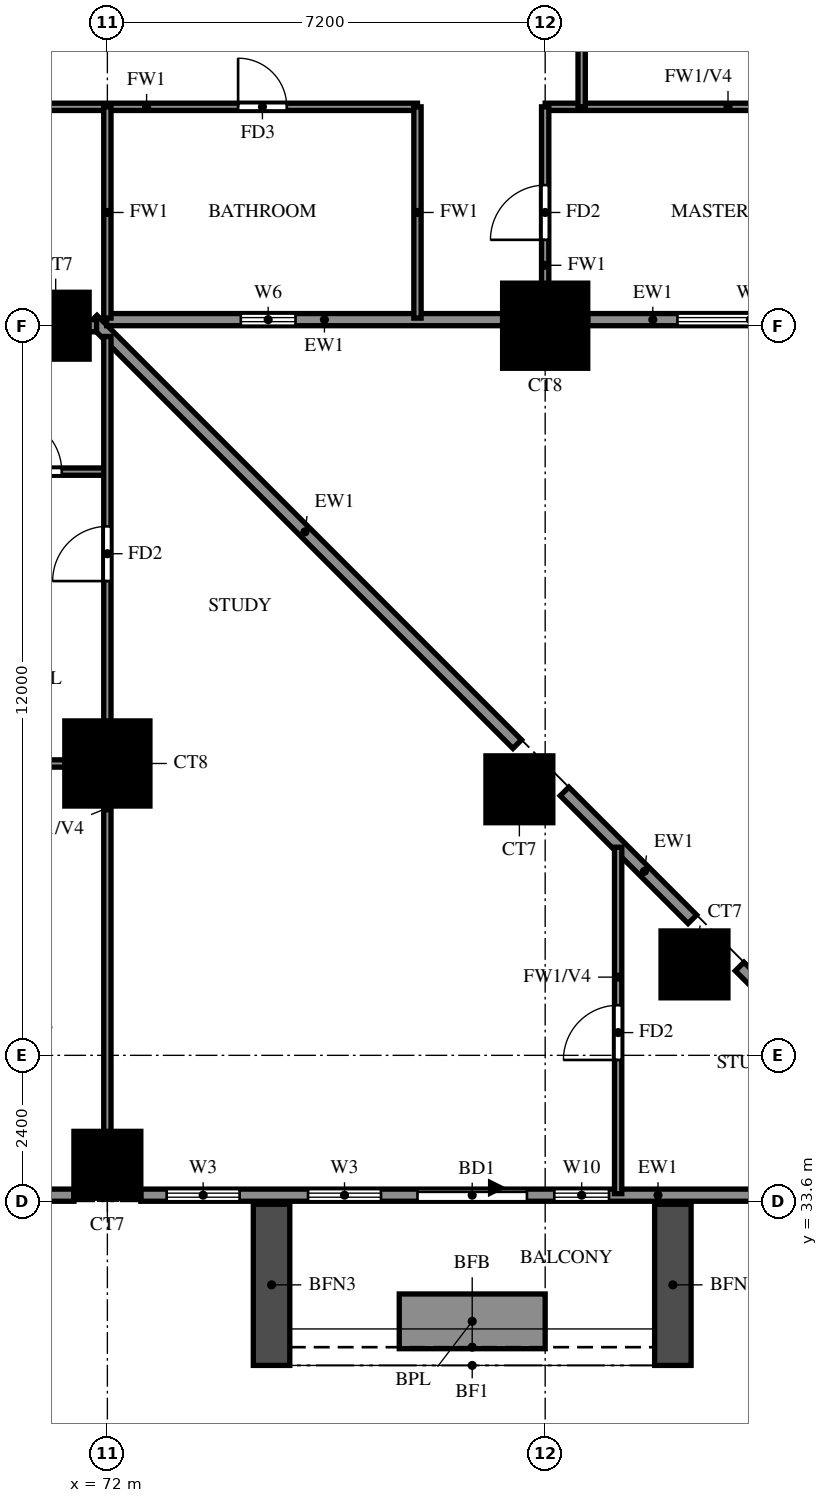
"""IFC4 building model, lengths in metres.
Left out: names, types, materials, properties, quantities, classifications, styles, units other than length and angle.
Written with IfcOpenShell. Run it as: python <this file> out.ifc"""

import sys

from ifc_helpers import new_model, si_unit, direction, frame, frame_2d, origin, origin_2d, place, context, subcontext, project, spatial, rectangle, extrude, source, transform, mapped, element, fill, save


model = new_model("IFC4")
c1 = context("Model", 3, precision=1e-05, world=origin(), true_north=direction((0.0, 1.0)))
c2 = subcontext(c1, "Body", "Model", "MODEL_VIEW")
j1 = project(units=[si_unit("LENGTHUNIT", "METRE"), si_unit("PLANEANGLEUNIT", "RADIAN")], contexts=[c1])
p1 = place(None, origin())
s1 = spatial("IfcSite", under=j1, at=p1, CompositionType="ELEMENT")
p2 = place(p1, origin())
s2 = spatial("IfcBuilding", under=s1, at=p2, CompositionType="ELEMENT")
p3 = place(p2, frame((0.0, 0.0, 37.5)))
s3 = spatial("IfcBuildingStorey", under=s2, at=p3, CompositionType="ELEMENT", Elevation=37.5)
m1 = source(origin(), c2, "Body", "SweptSolid", [
    extrude(rectangle(XDim=1.1, YDim=1.1, at=origin_2d()), origin(), (0.0, 0.0, 1.0), 3.18),
])
for number, where, z_axis, x_axis in (
    (1, (72.0, 34.2, 0.0), (0.0, 0.0, 1.0), (1.0, 0.0, 0.0)),
    (2, (81.656, 37.496, 0.0), (0.0, 0.0, 1.0), (1.0, 0.0, 0.0)),
    (3, (78.776, 40.376, 0.0), (0.0, 0.0, 1.0), (1.0, 0.0, 0.0)),
):
    element("IfcColumn", number, at=place(p3, frame(where, z_axis=z_axis, x_axis=x_axis)), inside=s3, PredefinedType="COLUMN", context=c2, shape_type="MappedRepresentation", body=[
        mapped(m1, transform((0.0, 0.0, 0.0))),
    ])
m2 = source(origin(), c2, "Body", "SweptSolid", [
    extrude(rectangle(XDim=1.4, YDim=1.4, at=origin_2d()), origin(), (0.0, 0.0, 1.0), 3.18),
])
p4 = place(p3, frame((72.0, 40.8, 0.0), z_axis=(0.0, 0.0, 1.0), x_axis=(1.0, 0.0, 0.0)))
e4 = element("IfcColumn", 4, at=p4, inside=s3, PredefinedType="COLUMN", context=c2, shape_type="MappedRepresentation", body=[
    mapped(m2, transform((0.0, 0.0, 0.0))),
])
p5 = place(p3, frame((71.15, 48.0, 0.0), z_axis=(0.0, 0.0, 1.0), x_axis=(1.0, 0.0, 0.0)))
e5 = element("IfcColumn", 5, at=p5, inside=s3, PredefinedType="COLUMN", context=c2, shape_type="MappedRepresentation", body=[
    mapped(m1, transform((0.0, 0.0, 0.0))),
])
p6 = place(p3, frame((79.2, 48.0, 0.0), z_axis=(0.0, 0.0, 1.0), x_axis=(1.0, 0.0, 0.0)))
e6 = element("IfcColumn", 6, at=p6, inside=s3, PredefinedType="COLUMN", context=c2, shape_type="MappedRepresentation", body=[
    mapped(m2, transform((0.0, 0.0, 0.0))),
])
p7 = place(p3, frame((85.996, 33.863, 0.0), z_axis=(0.0, 0.0, 1.0), x_axis=(-0.7070827891, 0.707130772459, 0.0)))
e7 = element("IfcWall", 7, at=p7, inside=s3, PredefinedType="SOLIDWALL", context=c2, shape_type="SweptSolid", body=[
    extrude(rectangle(XDim=5.088, YDim=0.2, at=frame_2d((2.544, 0.0))), origin(), (0.0, 0.0, 1.0), 3.18),
])
p8 = place(p3, frame((81.62, 38.238, 0.0), z_axis=(0.0, 0.0, 1.0), x_axis=(-0.707106781187, 0.707106781187, 0.0)))
e8 = element("IfcWall", 8, at=p8, inside=s3, PredefinedType="SOLIDWALL", context=c2, shape_type="SweptSolid", body=[
    extrude(rectangle(XDim=2.973, YDim=0.2, at=frame_2d((1.486, 0.0))), origin(), (0.0, 0.0, 1.0), 3.18),
])
p9 = place(p3, frame((78.74, 41.118, 0.0), z_axis=(0.0, 0.0, 1.0), x_axis=(-0.707106781187, 0.707106781187, 0.0)))
e9 = element("IfcWall", 9, at=p9, inside=s3, PredefinedType="SOLIDWALL", context=c2, shape_type="SweptSolid", body=[
    extrude(rectangle(XDim=9.874, YDim=0.2, at=frame_2d((4.937, 0.0))), origin(), (0.0, 0.0, 1.0), 3.18),
])
p10 = place(p3, frame((71.989, 48.1, 0.0), z_axis=(0.0, 0.0, 1.0), x_axis=(1.0, 0.0, 0.0)))
e10 = element("IfcWall", 10, at=p10, inside=s3, PredefinedType="SOLIDWALL", context=c2, shape_type="SweptSolid", body=[
    extrude(rectangle(XDim=6.511, YDim=0.2, at=frame_2d((3.256, 0.0))), origin(), (0.0, 0.0, 1.0), 3.18),
])
p11 = place(p10, frame((2.206, 0.0, 1.5)))
e11 = element("IfcOpeningElement", 11, at=p11, cuts=e10, PredefinedType="OPENING", context=c2, shape_type="SweptSolid", body=[
    extrude(rectangle(XDim=0.9, YDim=0.9, at=frame_2d((0.45, 0.45))), frame((0.0, 0.11, 0.0), z_axis=(0.0, -1.0, 0.0), x_axis=(1.0, 0.0, 0.0)), (0.0, 0.0, 1.0), 0.22),
])
p12 = place(p3, frame((79.9, 48.1, 0.0), z_axis=(0.0, 0.0, 1.0), x_axis=(1.0, 0.0, 0.0)))
e12 = element("IfcWall", 12, at=p12, inside=s3, PredefinedType="SOLIDWALL", context=c2, shape_type="SweptSolid", body=[
    extrude(rectangle(XDim=5.35, YDim=0.2, at=frame_2d((2.675, 0.0))), origin(), (0.0, 0.0, 1.0), 3.18),
])
p13 = place(p12, frame((1.475, 0.0, 0.6)))
e13 = element("IfcOpeningElement", 13, at=p13, cuts=e12, PredefinedType="OPENING", context=c2, shape_type="SweptSolid", body=[
    extrude(rectangle(XDim=2.4, YDim=2.4, at=frame_2d((1.2, 1.2))), frame((0.0, 0.11, 0.0), z_axis=(0.0, -1.0, 0.0), x_axis=(1.0, 0.0, 0.0)), (0.0, 0.0, 1.0), 0.22),
])
p14 = place(p3, frame((65.35, 33.7, 0.0), z_axis=(0.0, 0.0, 1.0), x_axis=(1.0, 0.0, 0.0)))
e14 = element("IfcWall", 14, at=p14, inside=s3, PredefinedType="SOLIDWALL", context=c2, shape_type="SweptSolid", body=[
    extrude(rectangle(XDim=6.1, YDim=0.2, at=frame_2d((3.05, 0.0))), origin(), (0.0, 0.0, 1.0), 3.18),
])
p15 = place(p14, frame((3.575, 0.0, 0.6)))
e15 = element("IfcOpeningElement", 15, at=p15, cuts=e14, PredefinedType="OPENING", context=c2, shape_type="SweptSolid", body=[
    extrude(rectangle(XDim=1.8, YDim=2.4, at=frame_2d((0.9, 1.2))), frame((0.0, 0.11, 0.0), z_axis=(0.0, -1.0, 0.0), x_axis=(1.0, 0.0, 0.0)), (0.0, 0.0, 1.0), 0.22),
])
p16 = place(p14, frame((2.0, 0.0, 0.6)))
e16 = element("IfcOpeningElement", 16, at=p16, cuts=e14, PredefinedType="OPENING", context=c2, shape_type="SweptSolid", body=[
    extrude(rectangle(XDim=0.9, YDim=2.4, at=frame_2d((0.45, 1.2))), frame((0.0, 0.11, 0.0), z_axis=(0.0, -1.0, 0.0), x_axis=(1.0, 0.0, 0.0)), (0.0, 0.0, 1.0), 0.22),
])
p17 = place(p3, frame((72.55, 33.7, 0.0), z_axis=(0.0, 0.0, 1.0), x_axis=(1.0, 0.0, 0.0)))
e17 = element("IfcWall", 17, at=p17, inside=s3, PredefinedType="SOLIDWALL", context=c2, shape_type="SweptSolid", body=[
    extrude(rectangle(XDim=13.609, YDim=0.2, at=frame_2d((6.804, 0.0))), origin(), (0.0, 0.0, 1.0), 3.18),
])
p18 = place(p17, frame((4.55, 0.0, 0.0)))
e18 = element("IfcOpeningElement", 18, at=p18, cuts=e17, PredefinedType="OPENING", context=c2, shape_type="SweptSolid", body=[
    extrude(rectangle(XDim=1.8, YDim=2.4, at=frame_2d((0.9, 1.2))), frame((0.0, 0.11, 0.0), z_axis=(0.0, -1.0, 0.0), x_axis=(1.0, 0.0, 0.0)), (0.0, 0.0, 1.0), 0.22),
])
p19 = place(p17, frame((0.425, 0.0, 0.6)))
e19 = element("IfcOpeningElement", 19, at=p19, cuts=e17, PredefinedType="OPENING", context=c2, shape_type="SweptSolid", body=[
    extrude(rectangle(XDim=1.2, YDim=2.4, at=frame_2d((0.6, 1.2))), frame((0.0, 0.11, 0.0), z_axis=(0.0, -1.0, 0.0), x_axis=(1.0, 0.0, 0.0)), (0.0, 0.0, 1.0), 0.22),
])
p20 = place(p17, frame((2.75, 0.0, 0.6)))
e20 = element("IfcOpeningElement", 20, at=p20, cuts=e17, PredefinedType="OPENING", context=c2, shape_type="SweptSolid", body=[
    extrude(rectangle(XDim=1.2, YDim=2.4, at=frame_2d((0.6, 1.2))), frame((0.0, 0.11, 0.0), z_axis=(0.0, -1.0, 0.0), x_axis=(1.0, 0.0, 0.0)), (0.0, 0.0, 1.0), 0.22),
])
p21 = place(p17, frame((6.8, 0.0, 0.6)))
e21 = element("IfcOpeningElement", 21, at=p21, cuts=e17, PredefinedType="OPENING", context=c2, shape_type="SweptSolid", body=[
    extrude(rectangle(XDim=0.9, YDim=2.4, at=frame_2d((0.45, 1.2))), frame((0.0, 0.11, 0.0), z_axis=(0.0, -1.0, 0.0), x_axis=(1.0, 0.0, 0.0)), (0.0, 0.0, 1.0), 0.22),
])
p22 = place(p17, frame((10.029, 0.0, 0.6)))
e22 = element("IfcOpeningElement", 22, at=p22, cuts=e17, PredefinedType="OPENING", context=c2, shape_type="SweptSolid", body=[
    extrude(rectangle(XDim=2.4, YDim=2.4, at=frame_2d((1.2, 1.2))), frame((0.0, 0.11, 0.0), z_axis=(0.0, -1.0, 0.0), x_axis=(1.0, 0.0, 0.0)), (0.0, 0.0, 1.0), 0.22),
])
for number, where, z_axis, x_axis in (
    (23, (74.7, 33.55, 0.0), (0.0, 0.0, 1.0), (0.0, -1.0, 0.0)),
    (24, (81.3, 33.55, 0.0), (0.0, 0.0, 1.0), (0.0, -1.0, 0.0)),
):
    element("IfcWall", number, at=place(p3, frame(where, z_axis=z_axis, x_axis=x_axis)), inside=s3, PredefinedType="SOLIDWALL", context=c2, shape_type="SweptSolid", body=[
        extrude(rectangle(XDim=2.65, YDim=0.6, at=frame_2d((1.325, 0.0))), origin(), (0.0, 0.0, 1.0), 2.85),
    ])
p23 = place(p3, frame((76.8, 31.625, 0.0), z_axis=(0.0, 0.0, 1.0), x_axis=(1.0, 0.0, 0.0)))
e25 = element("IfcWall", 25, at=p23, inside=s3, PredefinedType="SOLIDWALL", context=c2, shape_type="SweptSolid", body=[
    extrude(rectangle(XDim=2.4, YDim=0.9, at=frame_2d((1.2, 0.0))), origin(), (0.0, 0.0, 1.0), 0.9),
])
p24 = place(p3, frame((67.2, 48.0, 0.0), z_axis=(0.0, 0.0, 1.0), x_axis=(1.0, 0.0, 0.0)))
e26 = element("IfcWall", 26, at=p24, inside=s3, PredefinedType="SOLIDWALL", context=c2, shape_type="SweptSolid", body=[
    extrude(rectangle(XDim=4.623, YDim=0.2, at=frame_2d((2.312, 0.0))), origin(), (0.0, 0.0, 1.0), 3.18),
])
p25 = place(p3, frame((60.0, 40.8, 0.0), z_axis=(0.0, 0.0, 1.0), x_axis=(1.0, 0.0, 0.0)))
e27 = element("IfcWall", 27, at=p25, inside=s3, PredefinedType="PARTITIONING", context=c2, shape_type="SweptSolid", body=[
    extrude(rectangle(XDim=12.0, YDim=0.12, at=frame_2d((6.0, 0.0))), origin(), (0.0, 0.0, 1.0), 3.18),
])
p26 = place(p25, frame((9.75, 0.0, 0.0)))
e28 = element("IfcOpeningElement", 28, at=p26, cuts=e27, PredefinedType="OPENING", context=c2, shape_type="SweptSolid", body=[
    extrude(rectangle(XDim=0.9, YDim=2.1, at=frame_2d((0.45, 1.05))), frame((0.0, 0.07, 0.0), z_axis=(0.0, -1.0, 0.0), x_axis=(1.0, 0.0, 0.0)), (0.0, 0.0, 1.0), 0.14),
])
p27 = place(p25, frame((2.55, 0.0, 0.0)))
e29 = element("IfcOpeningElement", 29, at=p27, cuts=e27, PredefinedType="OPENING", context=c2, shape_type="SweptSolid", body=[
    extrude(rectangle(XDim=1.5, YDim=2.1, at=frame_2d((0.75, 1.05))), frame((0.0, 0.07, 0.0), z_axis=(0.0, -1.0, 0.0), x_axis=(1.0, 0.0, 0.0)), (0.0, 0.0, 1.0), 0.14),
])
p28 = place(p3, frame((67.2, 45.6, 0.0), z_axis=(0.0, 0.0, 1.0), x_axis=(1.0, 0.0, 0.0)))
e30 = element("IfcWall", 30, at=p28, inside=s3, PredefinedType="PARTITIONING", context=c2, shape_type="SweptSolid", body=[
    extrude(rectangle(XDim=4.8, YDim=0.12, at=frame_2d((2.4, 0.0))), origin(), (0.0, 0.0, 1.0), 3.18),
])
p29 = place(p28, frame((3.15, 0.0, 0.0)))
e31 = element("IfcOpeningElement", 31, at=p29, cuts=e30, PredefinedType="OPENING", context=c2, shape_type="SweptSolid", body=[
    extrude(rectangle(XDim=0.9, YDim=2.1, at=frame_2d((0.45, 1.05))), frame((0.0, 0.07, 0.0), z_axis=(0.0, -1.0, 0.0), x_axis=(1.0, 0.0, 0.0)), (0.0, 0.0, 1.0), 0.14),
])
p30 = place(p3, frame((67.2, 51.6, 0.0), z_axis=(0.0, 0.0, 1.0), x_axis=(1.0, 0.0, 0.0)))
e32 = element("IfcWall", 32, at=p30, inside=s3, PredefinedType="PARTITIONING", context=c2, shape_type="SweptSolid", body=[
    extrude(rectangle(XDim=9.9, YDim=0.12, at=frame_2d((4.95, 0.0))), origin(), (0.0, 0.0, 1.0), 3.18),
])
p31 = place(p30, frame((6.95, 0.0, 0.0)))
e33 = element("IfcOpeningElement", 33, at=p31, cuts=e32, PredefinedType="OPENING", context=c2, shape_type="SweptSolid", body=[
    extrude(rectangle(XDim=0.8, YDim=2.1, at=frame_2d((0.4, 1.05))), frame((0.0, 0.07, 0.0), z_axis=(0.0, -1.0, 0.0), x_axis=(1.0, 0.0, 0.0)), (0.0, 0.0, 1.0), 0.14),
])
p32 = place(p30, frame((1.95, 0.0, 0.0)))
e34 = element("IfcOpeningElement", 34, at=p32, cuts=e32, PredefinedType="OPENING", context=c2, shape_type="SweptSolid", body=[
    extrude(rectangle(XDim=0.9, YDim=2.1, at=frame_2d((0.45, 1.05))), frame((0.0, 0.07, 0.0), z_axis=(0.0, -1.0, 0.0), x_axis=(1.0, 0.0, 0.0)), (0.0, 0.0, 1.0), 0.14),
])
p33 = place(p3, frame((79.2, 51.6, 0.0), z_axis=(0.0, 0.0, 1.0), x_axis=(1.0, 0.0, 0.0)))
e35 = element("IfcWall", 35, at=p33, inside=s3, PredefinedType="PARTITIONING", context=c2, shape_type="SweptSolid", body=[
    extrude(rectangle(XDim=7.075, YDim=0.12, at=frame_2d((3.538, 0.0))), origin(), (0.0, 0.0, 1.0), 2.28),
])
p34 = place(p33, frame((3.438, 0.0, 0.0)))
e36 = element("IfcOpeningElement", 36, at=p34, cuts=e35, PredefinedType="OPENING", context=c2, shape_type="SweptSolid", body=[
    extrude(rectangle(XDim=0.8, YDim=2.1, at=frame_2d((0.4, 1.05))), frame((0.0, 0.07, 0.0), z_axis=(0.0, -1.0, 0.0), x_axis=(1.0, 0.0, 0.0)), (0.0, 0.0, 1.0), 0.14),
])
p35 = place(p3, frame((72.0, 33.725, 0.0), z_axis=(0.0, 0.0, 1.0), x_axis=(0.0, 1.0, 0.0)))
e37 = element("IfcWall", 37, at=p35, inside=s3, PredefinedType="PARTITIONING", context=c2, shape_type="SweptSolid", body=[
    extrude(rectangle(XDim=14.098, YDim=0.12, at=frame_2d((7.049, 0.0))), origin(), (0.0, 0.0, 1.0), 2.28),
])
p36 = place(p35, frame((10.075, 0.0, 0.0)))
e38 = element("IfcOpeningElement", 38, at=p36, cuts=e37, PredefinedType="OPENING", context=c2, shape_type="SweptSolid", body=[
    extrude(rectangle(XDim=0.9, YDim=2.1, at=frame_2d((0.45, 1.05))), frame((0.0, 0.07, 0.0), z_axis=(0.0, -1.0, 0.0), x_axis=(1.0, 0.0, 0.0)), (0.0, 0.0, 1.0), 0.14),
])
for number, where, z_axis, x_axis in (
    (39, (72.0, 48.125, 0.0), (0.0, 0.0, 1.0), (0.0, 1.0, 0.0)),
    (40, (77.1, 48.125, 0.0), (0.0, 0.0, 1.0), (0.0, 1.0, 0.0)),
):
    element("IfcWall", number, at=place(p3, frame(where, z_axis=z_axis, x_axis=x_axis)), inside=s3, PredefinedType="PARTITIONING", context=c2, shape_type="SweptSolid", body=[
        extrude(rectangle(XDim=3.475, YDim=0.12, at=frame_2d((1.738, 0.0))), origin(), (0.0, 0.0, 1.0), 3.18),
    ])
p37 = place(p3, frame((79.2, 48.125, 0.0), z_axis=(0.0, 0.0, 1.0), x_axis=(0.0, 1.0, 0.0)))
e41 = element("IfcWall", 41, at=p37, inside=s3, PredefinedType="PARTITIONING", context=c2, shape_type="SweptSolid", body=[
    extrude(rectangle(XDim=3.475, YDim=0.12, at=frame_2d((1.738, 0.0))), origin(), (0.0, 0.0, 1.0), 3.18),
])
p38 = place(p37, frame((1.288, 0.0, 0.0)))
e42 = element("IfcOpeningElement", 42, at=p38, cuts=e41, PredefinedType="OPENING", context=c2, shape_type="SweptSolid", body=[
    extrude(rectangle(XDim=0.9, YDim=2.1, at=frame_2d((0.45, 1.05))), frame((0.0, 0.07, 0.0), z_axis=(0.0, -1.0, 0.0), x_axis=(1.0, 0.0, 0.0)), (0.0, 0.0, 1.0), 0.14),
])
p39 = place(p3, frame((79.8, 51.6, 0.0), z_axis=(0.0, 0.0, 1.0), x_axis=(0.0, 1.0, 0.0)))
e43 = element("IfcWall", 43, at=p39, inside=s3, PredefinedType="PARTITIONING", context=c2, shape_type="SweptSolid", body=[
    extrude(rectangle(XDim=3.6, YDim=0.12, at=frame_2d((1.8, 0.0))), origin(), (0.0, 0.0, 1.0), 3.18),
])
p40 = place(p3, frame((80.4, 33.725, 0.0), z_axis=(0.0, 0.0, 1.0), x_axis=(0.0, 1.0, 0.0)))
e44 = element("IfcWall", 44, at=p40, inside=s3, PredefinedType="PARTITIONING", context=c2, shape_type="SweptSolid", body=[
    extrude(rectangle(XDim=5.698, YDim=0.12, at=frame_2d((2.849, 0.0))), origin(), (0.0, 0.0, 1.0), 2.28),
])
p41 = place(p40, frame((2.199, 0.0, 0.0)))
e45 = element("IfcOpeningElement", 45, at=p41, cuts=e44, PredefinedType="OPENING", context=c2, shape_type="SweptSolid", body=[
    extrude(rectangle(XDim=0.9, YDim=2.1, at=frame_2d((0.45, 1.05))), frame((0.0, 0.07, 0.0), z_axis=(0.0, -1.0, 0.0), x_axis=(1.0, 0.0, 0.0)), (0.0, 0.0, 1.0), 0.14),
])
p42 = place(p11, origin())
e46 = element("IfcWindow", 46, at=p42, inside=s3, PartitioningType="SINGLE_PANEL", PredefinedType="WINDOW", context=c2, shape_type="SweptSolid", body=[
    extrude(rectangle(XDim=0.9, YDim=0.9, at=frame_2d((0.45, 0.45))), frame((0.0, 0.03, 0.0), z_axis=(0.0, -1.0, 0.0), x_axis=(1.0, 0.0, 0.0)), (0.0, 0.0, 1.0), 0.06),
])
fill(e11, e46)
p43 = place(p13, origin())
e47 = element("IfcWindow", 47, at=p43, inside=s3, PartitioningType="DOUBLE_PANEL_VERTICAL", PredefinedType="WINDOW", context=c2, shape_type="SweptSolid", body=[
    extrude(rectangle(XDim=2.4, YDim=2.4, at=frame_2d((1.2, 1.2))), frame((0.0, 0.03, 0.0), z_axis=(0.0, -1.0, 0.0), x_axis=(1.0, 0.0, 0.0)), (0.0, 0.0, 1.0), 0.06),
])
fill(e13, e47)
p44 = place(p18, origin())
e48 = element("IfcDoor", 48, at=p44, inside=s3, OperationType="DOUBLE_DOOR_SLIDING", PredefinedType="DOOR", context=c2, shape_type="SweptSolid", body=[
    extrude(rectangle(XDim=1.8, YDim=2.4, at=frame_2d((0.9, 1.2))), frame((0.0, 0.025, 0.0), z_axis=(0.0, -1.0, 0.0), x_axis=(1.0, 0.0, 0.0)), (0.0, 0.0, 1.0), 0.05),
])
fill(e18, e48)
p45 = place(p19, origin())
e49 = element("IfcWindow", 49, at=p45, inside=s3, PartitioningType="SINGLE_PANEL", PredefinedType="WINDOW", context=c2, shape_type="SweptSolid", body=[
    extrude(rectangle(XDim=1.2, YDim=2.4, at=frame_2d((0.6, 1.2))), frame((0.0, 0.03, 0.0), z_axis=(0.0, -1.0, 0.0), x_axis=(1.0, 0.0, 0.0)), (0.0, 0.0, 1.0), 0.06),
])
fill(e19, e49)
p46 = place(p20, origin())
e50 = element("IfcWindow", 50, at=p46, inside=s3, PartitioningType="SINGLE_PANEL", PredefinedType="WINDOW", context=c2, shape_type="SweptSolid", body=[
    extrude(rectangle(XDim=1.2, YDim=2.4, at=frame_2d((0.6, 1.2))), frame((0.0, 0.03, 0.0), z_axis=(0.0, -1.0, 0.0), x_axis=(1.0, 0.0, 0.0)), (0.0, 0.0, 1.0), 0.06),
])
fill(e20, e50)
p47 = place(p21, origin())
e51 = element("IfcWindow", 51, at=p47, inside=s3, PartitioningType="SINGLE_PANEL", PredefinedType="WINDOW", context=c2, shape_type="SweptSolid", body=[
    extrude(rectangle(XDim=0.9, YDim=2.4, at=frame_2d((0.45, 1.2))), frame((0.0, 0.03, 0.0), z_axis=(0.0, -1.0, 0.0), x_axis=(1.0, 0.0, 0.0)), (0.0, 0.0, 1.0), 0.06),
])
fill(e21, e51)
p48 = place(p38, origin())
e52 = element("IfcDoor", 52, at=p48, inside=s3, OperationType="SINGLE_SWING_LEFT", PredefinedType="DOOR", context=c2, shape_type="SweptSolid", body=[
    extrude(rectangle(XDim=0.9, YDim=2.1, at=frame_2d((0.45, 1.05))), frame((0.0, 0.025, 0.0), z_axis=(0.0, -1.0, 0.0), x_axis=(1.0, 0.0, 0.0)), (0.0, 0.0, 1.0), 0.05),
])
fill(e42, e52)
p49 = place(p31, origin())
e53 = element("IfcDoor", 53, at=p49, inside=s3, OperationType="SINGLE_SWING_LEFT", PredefinedType="DOOR", context=c2, shape_type="SweptSolid", body=[
    extrude(rectangle(XDim=0.8, YDim=2.1, at=frame_2d((0.4, 1.05))), frame((0.0, 0.025, 0.0), z_axis=(0.0, -1.0, 0.0), x_axis=(1.0, 0.0, 0.0)), (0.0, 0.0, 1.0), 0.05),
])
fill(e33, e53)
p50 = place(p29, origin())
e54 = element("IfcDoor", 54, at=p50, inside=s3, OperationType="SINGLE_SWING_RIGHT", PredefinedType="DOOR", context=c2, shape_type="SweptSolid", body=[
    extrude(rectangle(XDim=0.9, YDim=2.1, at=frame_2d((0.45, 1.05))), frame((0.0, 0.025, 0.0), z_axis=(0.0, -1.0, 0.0), x_axis=(1.0, 0.0, 0.0)), (0.0, 0.0, 1.0), 0.05),
])
fill(e31, e54)
p51 = place(p36, origin())
e55 = element("IfcDoor", 55, at=p51, inside=s3, OperationType="SINGLE_SWING_LEFT", PredefinedType="DOOR", context=c2, shape_type="SweptSolid", body=[
    extrude(rectangle(XDim=0.9, YDim=2.1, at=frame_2d((0.45, 1.05))), frame((0.0, 0.025, 0.0), z_axis=(0.0, -1.0, 0.0), x_axis=(1.0, 0.0, 0.0)), (0.0, 0.0, 1.0), 0.05),
])
fill(e38, e55)
p52 = place(p41, origin())
e56 = element("IfcDoor", 56, at=p52, inside=s3, OperationType="SINGLE_SWING_RIGHT", PredefinedType="DOOR", context=c2, shape_type="SweptSolid", body=[
    extrude(rectangle(XDim=0.9, YDim=2.1, at=frame_2d((0.45, 1.05))), frame((0.0, 0.025, 0.0), z_axis=(0.0, -1.0, 0.0), x_axis=(1.0, 0.0, 0.0)), (0.0, 0.0, 1.0), 0.05),
])
fill(e45, e56)
save(model, sys.argv[1])
